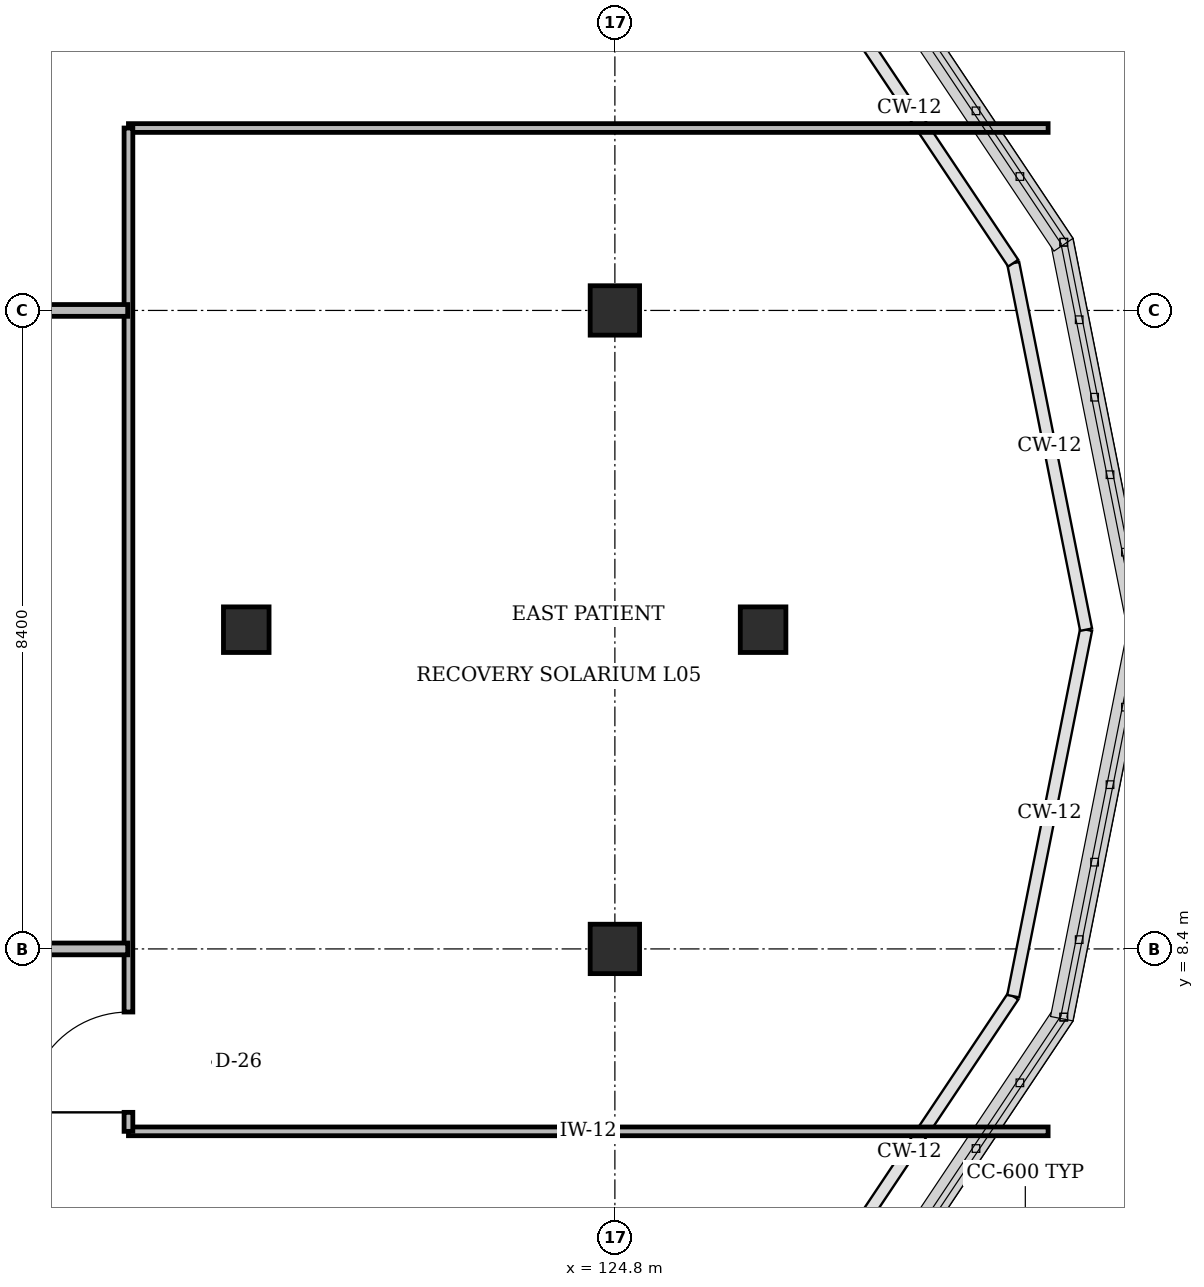
"""IFC4 building model, lengths in metres.
Left out: names, types, materials, properties, quantities, classifications, styles, units other than length and angle.
Written with IfcOpenShell. Run it as: python <this file> out.ifc"""

import sys

from ifc_helpers import new_model, si_unit, direction, frame, frame_2d, origin, origin_2d, place, context, subcontext, project, spatial, rectangle, circle, extrude, element, fill, save


model = new_model("IFC4")
c1 = context("Model", 3, precision=1e-05, world=origin(), true_north=direction((0.0, 1.0)))
c2 = subcontext(c1, "Body", "Model", "MODEL_VIEW")
j1 = project(units=[si_unit("LENGTHUNIT", "METRE"), si_unit("PLANEANGLEUNIT", "RADIAN")], contexts=[c1])
p1 = place(None, origin())
s1 = spatial("IfcSite", under=j1, at=p1, CompositionType="ELEMENT")
p2 = place(p1, origin())
s2 = spatial("IfcBuilding", under=s1, at=p2, CompositionType="ELEMENT")
p3 = place(p2, frame((0.0, 0.0, 22.2)))
s3 = spatial("IfcBuildingStorey", under=s2, at=p3, CompositionType="ELEMENT", Elevation=22.2)
for number, where, z_axis, x_axis in (
    (1, (124.8, 8.4, 0.0), (0.0, 0.0, 1.0), (1.0, 0.0, 0.0)),
    (2, (124.8, 16.8, 0.0), (0.0, 0.0, 1.0), (1.0, 0.0, 0.0)),
):
    element("IfcColumn", number, at=place(p3, frame(where, z_axis=z_axis, x_axis=x_axis)), inside=s3, PredefinedType="COLUMN", context=c2, shape_type="SweptSolid", body=[
        extrude(rectangle(XDim=0.65, YDim=0.65, at=origin_2d()), origin(), (0.0, 0.0, 1.0), 4.2),
    ])
p4 = place(p3, frame((126.75, 12.6, 0.0), z_axis=(0.0, 0.0, 1.0), x_axis=(1.0, 0.0, 0.0)))
e3 = element("IfcColumn", 3, at=p4, inside=s3, PredefinedType="PILASTER", context=c2, shape_type="SweptSolid", body=[
    extrude(circle(Radius=0.3, at=origin_2d()), origin(), (0.0, 0.0, 1.0), 3.95),
])
p5 = place(p3, frame((119.95, 12.6, 0.0), z_axis=(0.0, 0.0, 1.0), x_axis=(1.0, 0.0, 0.0)))
e4 = element("IfcColumn", 4, at=p5, inside=s3, PredefinedType="PILASTER", context=c2, shape_type="SweptSolid", body=[
    extrude(circle(Radius=0.3, at=origin_2d()), origin(), (0.0, 0.0, 1.0), 4.2),
])
for number, where, z_axis, x_axis in (
    (5, (118.4, 6.0, 0.0), (0.0, 0.0, 1.0), (1.0, 0.0, 0.0)),
    (6, (118.4, 19.2, 0.0), (0.0, 0.0, 1.0), (1.0, 0.0, 0.0)),
):
    element("IfcWall", number, at=place(p3, frame(where, z_axis=z_axis, x_axis=x_axis)), inside=s3, PredefinedType="PARTITIONING", context=c2, shape_type="SweptSolid", body=[
        extrude(rectangle(XDim=12.1, YDim=0.115, at=frame_2d((6.05, 0.0))), origin(), (0.0, 0.0, 1.0), 3.9),
    ])
p6 = place(p3, frame((118.4, 6.0, 0.0), z_axis=(0.0, 0.0, 1.0), x_axis=(0.0, 1.0, 0.0)))
e7 = element("IfcWall", 7, at=p6, inside=s3, PredefinedType="PARTITIONING", context=c2, shape_type="SweptSolid", body=[
    extrude(rectangle(XDim=13.2, YDim=0.115, at=frame_2d((6.6, 0.0))), origin(), (0.0, 0.0, 1.0), 3.9),
])
p7 = place(p6, frame((0.25, 0.0, 0.0)))
e8 = element("IfcOpeningElement", 8, at=p7, cuts=e7, PredefinedType="OPENING", context=c2, shape_type="SweptSolid", body=[
    extrude(rectangle(XDim=1.32, YDim=2.15, at=frame_2d((0.66, 1.075))), frame((0.0, 0.067, 0.0), z_axis=(0.0, -1.0, 0.0), x_axis=(1.0, 0.0, 0.0)), (0.0, 0.0, 1.0), 0.135),
])
p8 = place(p3, frame((101.96, 8.4, 0.0), z_axis=(0.0, 0.0, 1.0), x_axis=(1.0, 0.0, 0.0)))
e9 = element("IfcWall", 9, at=p8, inside=s3, PredefinedType="PARTITIONING", context=c2, shape_type="SweptSolid", body=[
    extrude(rectangle(XDim=16.43, YDim=0.155, at=frame_2d((8.215, 0.0))), origin(), (0.0, 0.0, 1.0), 3.27),
])
p9 = place(p8, frame((9.158, 0.0, 0.0)))
e10 = element("IfcOpeningElement", 10, at=p9, cuts=e9, PredefinedType="OPENING", context=c2, shape_type="SweptSolid", body=[
    extrude(rectangle(XDim=1.4, YDim=2.2, at=frame_2d((0.7, 1.1))), frame((0.0, 0.087, 0.0), z_axis=(0.0, -1.0, 0.0), x_axis=(1.0, 0.0, 0.0)), (0.0, 0.0, 1.0), 0.175),
])
p10 = place(p3, frame((101.96, 16.8, 0.0), z_axis=(0.0, 0.0, 1.0), x_axis=(1.0, 0.0, 0.0)))
e11 = element("IfcWall", 11, at=p10, inside=s3, PredefinedType="PARTITIONING", context=c2, shape_type="SweptSolid", body=[
    extrude(rectangle(XDim=16.43, YDim=0.155, at=frame_2d((8.215, 0.0))), origin(), (0.0, 0.0, 1.0), 3.27),
])
p11 = place(p7, origin())
e12 = element("IfcDoor", 12, at=p11, inside=s3, OperationType="SINGLE_SWING_LEFT", PredefinedType="DOOR", context=c2, shape_type="SweptSolid", body=[
    extrude(rectangle(XDim=1.32, YDim=2.15, at=frame_2d((0.66, 1.075))), frame((0.0, 0.025, 0.0), z_axis=(0.0, -1.0, 0.0), x_axis=(1.0, 0.0, 0.0)), (0.0, 0.0, 1.0), 0.05),
])
fill(e8, e12)
save(model, sys.argv[1])
